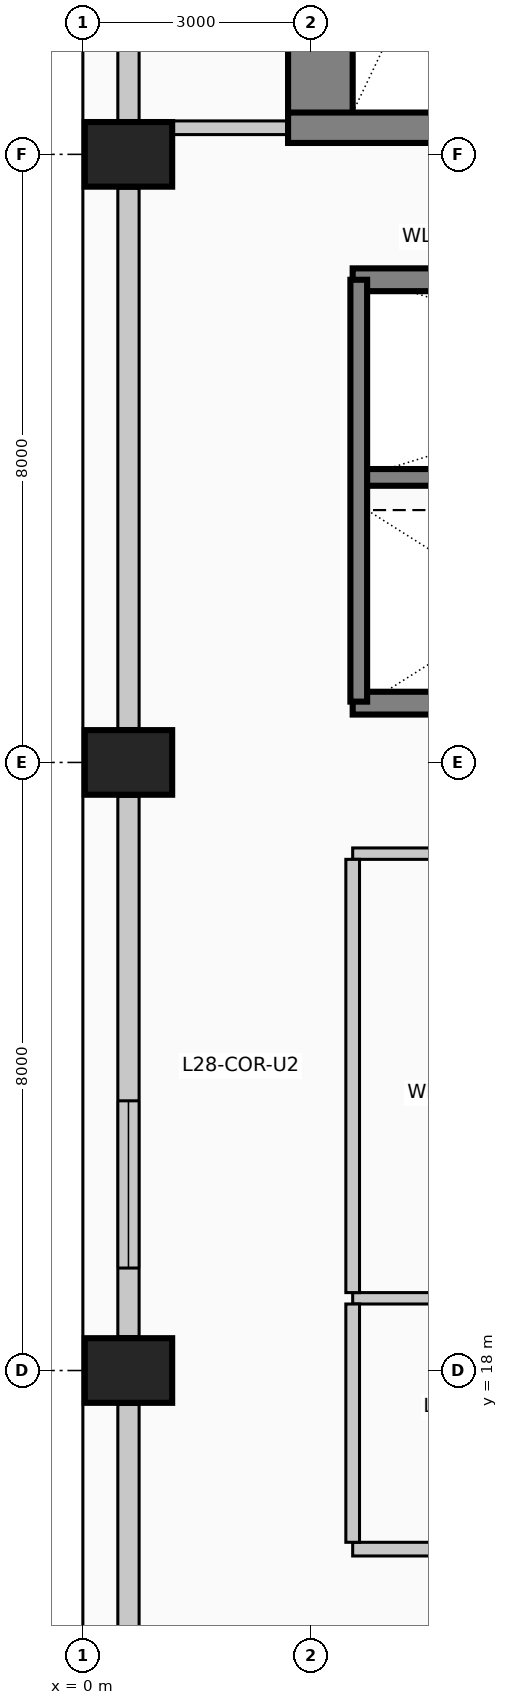
"""IFC4 building model, lengths in metres.
Left out: names, types, materials, properties, quantities, classifications, styles, units other than length and angle.
Written with IfcOpenShell. Run it as: python <this file> out.ifc"""

import sys

from ifc_helpers import new_model, si_unit, direction, frame, frame_2d, origin, origin_2d, place, context, subcontext, project, spatial, rectangle, extrude, element, fill, save


model = new_model("IFC4")
c1 = context("Model", 3, precision=1e-05, world=origin(), true_north=direction((0.0, 1.0)))
c2 = subcontext(c1, "Body", "Model", "MODEL_VIEW")
j1 = project(units=[si_unit("LENGTHUNIT", "METRE"), si_unit("PLANEANGLEUNIT", "RADIAN")], contexts=[c1])
p1 = place(None, origin())
s1 = spatial("IfcSite", under=j1, at=p1, CompositionType="ELEMENT")
p2 = place(p1, origin())
s2 = spatial("IfcBuilding", under=s1, at=p2, CompositionType="ELEMENT")
p3 = place(p2, frame((0.0, 0.0, 116.6)))
s3 = spatial("IfcBuildingStorey", under=s2, at=p3, CompositionType="ELEMENT", Elevation=116.6)
p4 = place(p3, frame((3.125, 34.15, 0.0), z_axis=(0.0, 0.0, 1.0), x_axis=(0.0, 1.0, 0.0)))
e1 = element("IfcWall", 1, at=p4, inside=s3, PredefinedType="SHEAR", context=c2, shape_type="SweptSolid", body=[
    extrude(rectangle(XDim=9.13, YDim=0.85, at=frame_2d((4.565, 0.0))), origin(), (0.0, 0.0, 1.0), 4.0),
])
p5 = place(p3, frame((2.7, 34.35, 0.0), z_axis=(0.0, 0.0, 1.0), x_axis=(1.0, 0.0, 0.0)))
e2 = element("IfcWall", 2, at=p5, inside=s3, PredefinedType="SHEAR", context=c2, shape_type="SweptSolid", body=[
    extrude(rectangle(XDim=5.01, YDim=0.4, at=frame_2d((2.505, 0.0))), origin(), (0.0, 0.0, 1.0), 4.0),
])
p6 = place(p5, frame((2.4, 0.0, 0.0)))
e3 = element("IfcOpeningElement", 3, at=p6, cuts=e2, PredefinedType="OPENING", context=c2, shape_type="SweptSolid", body=[
    extrude(rectangle(XDim=1.15, YDim=2.2, at=frame_2d((0.575, 1.1))), frame((0.0, 0.21, 0.0), z_axis=(0.0, -1.0, 0.0), x_axis=(1.0, 0.0, 0.0)), (0.0, 0.0, 1.0), 0.42),
])
for number, where, z_axis, x_axis in (
    (4, (0.6, 18.0, 0.0), (0.0, 0.0, 1.0), (0.0, 1.0, 0.0)),
    (5, (0.6, 26.0, 0.0), (0.0, 0.0, 1.0), (0.0, 1.0, 0.0)),
    (6, (0.6, 34.0, 0.0), (0.0, 0.0, 1.0), (0.0, 1.0, 0.0)),
):
    element("IfcColumn", number, at=place(p3, frame(where, z_axis=z_axis, x_axis=x_axis)), inside=s3, PredefinedType="COLUMN", context=c2, shape_type="SweptSolid", body=[
        extrude(rectangle(XDim=0.85, YDim=1.15, at=origin_2d()), origin(), (0.0, 0.0, 1.0), 4.0),
    ])
p7 = place(p3, frame((0.6, 10.445, 0.0), z_axis=(0.0, 0.0, 1.0), x_axis=(0.0, 1.0, 0.0)))
e7 = element("IfcWall", 7, at=p7, inside=s3, PredefinedType="SOLIDWALL", context=c2, shape_type="SweptSolid", body=[
    extrude(rectangle(XDim=7.11, YDim=0.28, at=frame_2d((3.555, 0.0))), origin(), (0.0, 0.0, 1.0), 2.875),
])
p8 = place(p3, frame((0.6, 18.445, 0.0), z_axis=(0.0, 0.0, 1.0), x_axis=(0.0, 1.0, 0.0)))
e8 = element("IfcWall", 8, at=p8, inside=s3, PredefinedType="SOLIDWALL", context=c2, shape_type="SweptSolid", body=[
    extrude(rectangle(XDim=7.11, YDim=0.28, at=frame_2d((3.555, 0.0))), origin(), (0.0, 0.0, 1.0), 2.875),
])
p9 = place(p8, frame((0.903, 0.0, 0.5)))
e9 = element("IfcOpeningElement", 9, at=p9, cuts=e8, PredefinedType="OPENING", context=c2, shape_type="SweptSolid", body=[
    extrude(rectangle(XDim=2.2, YDim=1.95, at=frame_2d((1.1, 0.975))), frame((0.0, 0.15, 0.0), z_axis=(0.0, -1.0, 0.0), x_axis=(1.0, 0.0, 0.0)), (0.0, 0.0, 1.0), 0.3),
])
p10 = place(p3, frame((0.6, 26.445, 0.0), z_axis=(0.0, 0.0, 1.0), x_axis=(0.0, 1.0, 0.0)))
e10 = element("IfcWall", 10, at=p10, inside=s3, PredefinedType="SOLIDWALL", context=c2, shape_type="SweptSolid", body=[
    extrude(rectangle(XDim=7.11, YDim=0.28, at=frame_2d((3.555, 0.0))), origin(), (0.0, 0.0, 1.0), 2.875),
])
p11 = place(p3, frame((0.6, 34.445, 0.0), z_axis=(0.0, 0.0, 1.0), x_axis=(0.0, 1.0, 0.0)))
e11 = element("IfcWall", 11, at=p11, inside=s3, PredefinedType="SOLIDWALL", context=c2, shape_type="SweptSolid", body=[
    extrude(rectangle(XDim=7.51, YDim=0.28, at=frame_2d((3.755, 0.0))), origin(), (0.0, 0.0, 1.0), 2.875),
])
for number, where, z_axis, x_axis in (
    (12, (3.55, 32.35, 0.0), (0.0, 0.0, 1.0), (1.0, 0.0, 0.0)),
    (13, (5.65, 26.78, 0.0), (0.0, 0.0, 1.0), (-1.0, 0.0, 0.0)),
):
    element("IfcWall", number, at=place(p3, frame(where, z_axis=z_axis, x_axis=x_axis)), inside=s3, PredefinedType="SOLIDWALL", context=c2, shape_type="SweptSolid", body=[
        extrude(rectangle(XDim=2.1, YDim=0.3, at=frame_2d((1.05, 0.0))), origin(), (0.0, 0.0, 1.0), 4.0),
    ])
p12 = place(p3, frame((3.55, 29.75, 0.0), z_axis=(0.0, 0.0, 1.0), x_axis=(1.0, 0.0, 0.0)))
e14 = element("IfcWall", 14, at=p12, inside=s3, PredefinedType="SOLIDWALL", context=c2, shape_type="SweptSolid", body=[
    extrude(rectangle(XDim=8.65, YDim=0.22, at=frame_2d((4.325, 0.0))), origin(), (0.0, 0.0, 1.0), 4.0),
])
p13 = place(p3, frame((3.63, 26.8, 0.0), z_axis=(0.0, 0.0, 1.0), x_axis=(0.0, 1.0, 0.0)))
e15 = element("IfcWall", 15, at=p13, inside=s3, PredefinedType="SOLIDWALL", context=c2, shape_type="SweptSolid", body=[
    extrude(rectangle(XDim=5.55, YDim=0.22, at=frame_2d((2.775, 0.0))), origin(), (0.0, 0.0, 1.0), 4.0),
])
p14 = place(p3, frame((3.55, 15.65, 0.0), z_axis=(0.0, 0.0, 1.0), x_axis=(1.0, 0.0, 0.0)))
e16 = element("IfcWall", 16, at=p14, inside=s3, PredefinedType="PARTITIONING", context=c2, shape_type="SweptSolid", body=[
    extrude(rectangle(XDim=3.25, YDim=0.18, at=frame_2d((1.625, 0.0))), origin(), (0.0, 0.0, 1.0), 3.725),
])
p15 = place(p14, frame((1.15, 0.0, 0.0)))
e17 = element("IfcOpeningElement", 17, at=p15, cuts=e16, PredefinedType="OPENING", context=c2, shape_type="SweptSolid", body=[
    extrude(rectangle(XDim=0.95, YDim=2.15, at=frame_2d((0.475, 1.075))), frame((0.0, 0.1, 0.0), z_axis=(0.0, -1.0, 0.0), x_axis=(1.0, 0.0, 0.0)), (0.0, 0.0, 1.0), 0.2),
])
p16 = place(p3, frame((3.55, 18.95, 0.0), z_axis=(0.0, 0.0, 1.0), x_axis=(1.0, 0.0, 0.0)))
e18 = element("IfcWall", 18, at=p16, inside=s3, PredefinedType="PARTITIONING", context=c2, shape_type="SweptSolid", body=[
    extrude(rectangle(XDim=3.25, YDim=0.15, at=frame_2d((1.625, 0.0))), origin(), (0.0, 0.0, 1.0), 3.725),
])
p17 = place(p3, frame((3.55, 24.8, 0.0), z_axis=(0.0, 0.0, 1.0), x_axis=(1.0, 0.0, 0.0)))
e19 = element("IfcWall", 19, at=p17, inside=s3, PredefinedType="PARTITIONING", context=c2, shape_type="SweptSolid", body=[
    extrude(rectangle(XDim=6.25, YDim=0.15, at=frame_2d((3.125, 0.0))), origin(), (0.0, 0.0, 1.0), 3.725),
])
p18 = place(p17, frame((2.65, 0.0, 0.0)))
e20 = element("IfcOpeningElement", 20, at=p18, cuts=e19, PredefinedType="OPENING", context=c2, shape_type="SweptSolid", body=[
    extrude(rectangle(XDim=0.95, YDim=2.15, at=frame_2d((0.475, 1.075))), frame((0.0, 0.085, 0.0), z_axis=(0.0, -1.0, 0.0), x_axis=(1.0, 0.0, 0.0)), (0.0, 0.0, 1.0), 0.17),
])
p19 = place(p3, frame((1.175, 34.35, 0.0), z_axis=(0.0, 0.0, 1.0), x_axis=(1.0, 0.0, 0.0)))
e21 = element("IfcWall", 21, at=p19, inside=s3, PredefinedType="PARTITIONING", context=c2, shape_type="SweptSolid", body=[
    extrude(rectangle(XDim=1.525, YDim=0.18, at=frame_2d((0.762, 0.0))), origin(), (0.0, 0.0, 1.0), 3.725),
])
p20 = place(p3, frame((3.55, 15.74, 0.0), z_axis=(0.0, 0.0, 1.0), x_axis=(0.0, 1.0, 0.0)))
e22 = element("IfcWall", 22, at=p20, inside=s3, PredefinedType="PARTITIONING", context=c2, shape_type="SweptSolid", body=[
    extrude(rectangle(XDim=3.135, YDim=0.18, at=frame_2d((1.567, 0.0))), origin(), (0.0, 0.0, 1.0), 3.725),
])
p21 = place(p3, frame((3.55, 19.025, 0.0), z_axis=(0.0, 0.0, 1.0), x_axis=(0.0, 1.0, 0.0)))
e23 = element("IfcWall", 23, at=p21, inside=s3, PredefinedType="PARTITIONING", context=c2, shape_type="SweptSolid", body=[
    extrude(rectangle(XDim=5.7, YDim=0.18, at=frame_2d((2.85, 0.0))), origin(), (0.0, 0.0, 1.0), 3.725),
])
p22 = place(p9, origin())
e24 = element("IfcWindow", 24, at=p22, inside=s3, PartitioningType="SINGLE_PANEL", PredefinedType="WINDOW", context=c2, shape_type="SweptSolid", body=[
    extrude(rectangle(XDim=2.2, YDim=1.95, at=frame_2d((1.1, 0.975))), frame((0.0, 0.03, 0.0), z_axis=(0.0, -1.0, 0.0), x_axis=(1.0, 0.0, 0.0)), (0.0, 0.0, 1.0), 0.06),
])
fill(e9, e24)
save(model, sys.argv[1])
